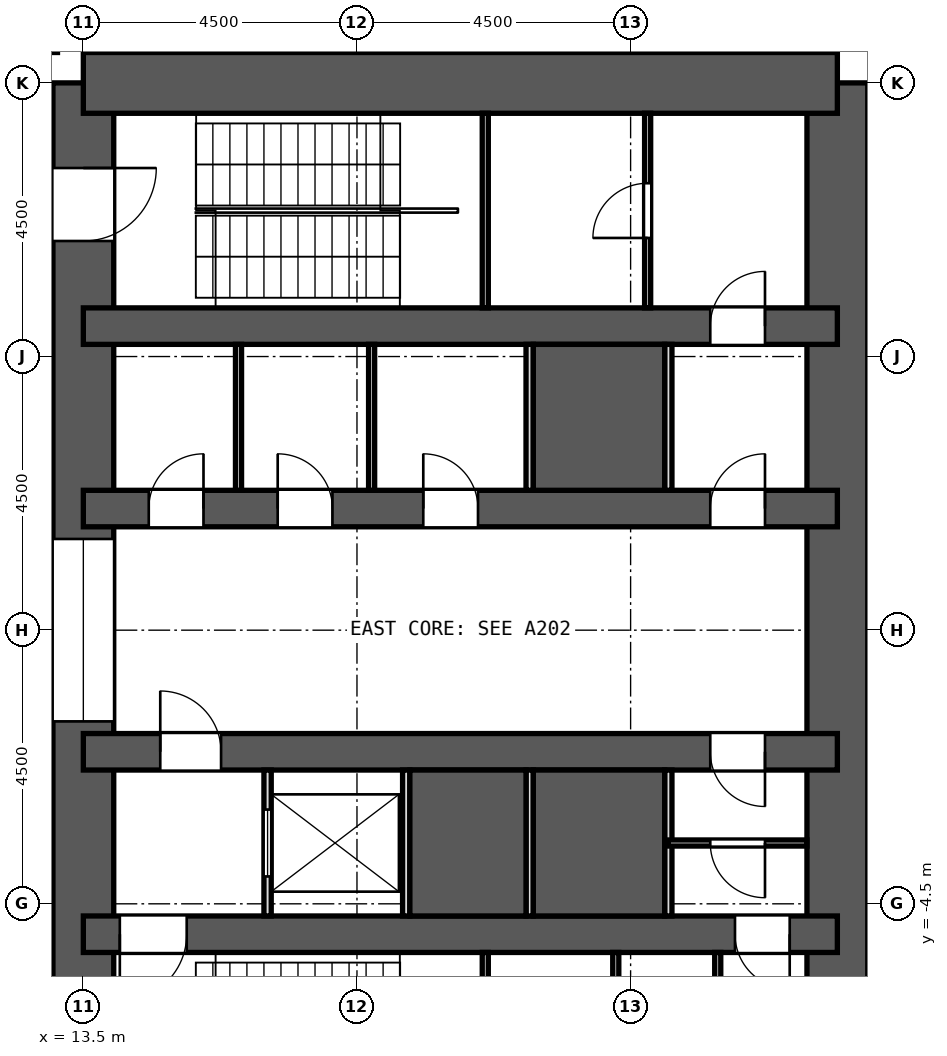
"""IFC4 building model, lengths in metres.
Left out: names, types, materials, properties, quantities, classifications, styles, units other than length and angle.
Written with IfcOpenShell. Run it as: python <this file> out.ifc"""

import sys

from ifc_helpers import new_model, si_unit, direction, frame, frame_2d, origin, place, context, subcontext, project, spatial, rectangle, extrude, element, fill, save


model = new_model("IFC4")
c1 = context("Model", 3, precision=1e-05, world=origin(), true_north=direction((0.0, 1.0)))
c2 = subcontext(c1, "Body", "Model", "MODEL_VIEW")
j1 = project(units=[si_unit("LENGTHUNIT", "METRE"), si_unit("PLANEANGLEUNIT", "RADIAN")], contexts=[c1])
p1 = place(None, origin())
s1 = spatial("IfcSite", under=j1, at=p1, CompositionType="ELEMENT")
p2 = place(p1, origin())
s2 = spatial("IfcBuilding", under=s1, at=p2, CompositionType="ELEMENT")
p3 = place(p2, frame((0.0, 0.0, -4.5)))
s3 = spatial("IfcBuildingStorey", under=s2, at=p3, CompositionType="ELEMENT", Elevation=-4.5)
p4 = place(p3, frame((13.5, -9.0, 0.0), z_axis=(0.0, 0.0, 1.0), x_axis=(0.0, 1.0, 0.0)))
e1 = element("IfcWall", 1, at=p4, inside=s3, PredefinedType="SHEAR", context=c2, shape_type="SweptSolid", body=[
    extrude(rectangle(XDim=18.0, YDim=1.0, at=frame_2d((9.0, 0.0))), origin(), (0.0, 0.0, 1.0), 4.5),
])
p5 = place(p4, frame((15.4, 0.0, 0.0)))
e2 = element("IfcOpeningElement", 2, at=p5, cuts=e1, PredefinedType="OPENING", context=c2, shape_type="SweptSolid", body=[
    extrude(rectangle(XDim=1.2, YDim=2.1, at=frame_2d((0.6, 1.05))), frame((0.0, 0.512, 0.0), z_axis=(0.0, -1.0, 0.0), x_axis=(1.0, 0.0, 0.0)), (0.0, 0.0, 1.0), 1.024),
])
p6 = place(p4, frame((1.4, 0.0, 0.0)))
e3 = element("IfcOpeningElement", 3, at=p6, cuts=e1, PredefinedType="OPENING", context=c2, shape_type="SweptSolid", body=[
    extrude(rectangle(XDim=1.2, YDim=2.1, at=frame_2d((0.6, 1.05))), frame((0.0, 0.512, 0.0), z_axis=(0.0, -1.0, 0.0), x_axis=(1.0, 0.0, 0.0)), (0.0, 0.0, 1.0), 1.024),
])
p7 = place(p4, frame((7.5, 0.0, 0.0)))
e4 = element("IfcOpeningElement", 4, at=p7, cuts=e1, PredefinedType="OPENING", context=c2, shape_type="SweptSolid", body=[
    extrude(rectangle(XDim=3.0, YDim=2.4, at=frame_2d((1.5, 1.2))), frame((0.0, 0.512, 0.0), z_axis=(0.0, -1.0, 0.0), x_axis=(1.0, 0.0, 0.0)), (0.0, 0.0, 1.0), 1.024),
])
p8 = place(p3, frame((25.9, -9.0, 0.0), z_axis=(0.0, 0.0, 1.0), x_axis=(0.0, 1.0, 0.0)))
e5 = element("IfcWall", 5, at=p8, inside=s3, PredefinedType="SHEAR", context=c2, shape_type="SweptSolid", body=[
    extrude(rectangle(XDim=18.0, YDim=1.0, at=frame_2d((9.0, 0.0))), origin(), (0.0, 0.0, 1.0), 4.5),
])
p9 = place(p3, frame((13.5, 9.0, 0.0), z_axis=(0.0, 0.0, 1.0), x_axis=(1.0, 0.0, 0.0)))
e6 = element("IfcWall", 6, at=p9, inside=s3, PredefinedType="SHEAR", context=c2, shape_type="SweptSolid", body=[
    extrude(rectangle(XDim=12.4, YDim=1.0, at=frame_2d((6.2, 0.0))), origin(), (0.0, 0.0, 1.0), 4.5),
])
p10 = place(p3, frame((13.5, 5.0, 0.0), z_axis=(0.0, 0.0, 1.0), x_axis=(1.0, 0.0, 0.0)))
e7 = element("IfcWall", 7, at=p10, inside=s3, PredefinedType="SHEAR", context=c2, shape_type="SweptSolid", body=[
    extrude(rectangle(XDim=12.4, YDim=0.6, at=frame_2d((6.2, 0.0))), origin(), (0.0, 0.0, 1.0), 4.5),
])
p11 = place(p10, frame((10.31, 0.0, 0.0)))
e8 = element("IfcOpeningElement", 8, at=p11, cuts=e7, PredefinedType="OPENING", context=c2, shape_type="SweptSolid", body=[
    extrude(rectangle(XDim=0.9, YDim=2.1, at=frame_2d((0.45, 1.05))), frame((0.0, 0.312, 0.0), z_axis=(0.0, -1.0, 0.0), x_axis=(1.0, 0.0, 0.0)), (0.0, 0.0, 1.0), 0.624),
])
p12 = place(p3, frame((13.5, -5.0, 0.0), z_axis=(0.0, 0.0, 1.0), x_axis=(1.0, 0.0, 0.0)))
e9 = element("IfcWall", 9, at=p12, inside=s3, PredefinedType="SHEAR", context=c2, shape_type="SweptSolid", body=[
    extrude(rectangle(XDim=12.4, YDim=0.6, at=frame_2d((6.2, 0.0))), origin(), (0.0, 0.0, 1.0), 4.5),
])
p13 = place(p12, frame((10.716, 0.0, 0.0)))
e10 = element("IfcOpeningElement", 10, at=p13, cuts=e9, PredefinedType="OPENING", context=c2, shape_type="SweptSolid", body=[
    extrude(rectangle(XDim=0.9, YDim=2.1, at=frame_2d((0.45, 1.05))), frame((0.0, 0.312, 0.0), z_axis=(0.0, -1.0, 0.0), x_axis=(1.0, 0.0, 0.0)), (0.0, 0.0, 1.0), 0.624),
])
p14 = place(p12, frame((0.6, 0.0, 0.0)))
e11 = element("IfcOpeningElement", 11, at=p14, cuts=e9, PredefinedType="OPENING", context=c2, shape_type="SweptSolid", body=[
    extrude(rectangle(XDim=1.1, YDim=2.1, at=frame_2d((0.55, 1.05))), frame((0.0, 0.312, 0.0), z_axis=(0.0, -1.0, 0.0), x_axis=(1.0, 0.0, 0.0)), (0.0, 0.0, 1.0), 0.624),
])
p15 = place(p3, frame((13.5, 2.0, 0.0), z_axis=(0.0, 0.0, 1.0), x_axis=(1.0, 0.0, 0.0)))
e12 = element("IfcWall", 12, at=p15, inside=s3, PredefinedType="SHEAR", context=c2, shape_type="SweptSolid", body=[
    extrude(rectangle(XDim=12.4, YDim=0.6, at=frame_2d((6.2, 0.0))), origin(), (0.0, 0.0, 1.0), 4.5),
])
p16 = place(p15, frame((1.076, 0.0, 0.0)))
e13 = element("IfcOpeningElement", 13, at=p16, cuts=e12, PredefinedType="OPENING", context=c2, shape_type="SweptSolid", body=[
    extrude(rectangle(XDim=0.9, YDim=2.1, at=frame_2d((0.45, 1.05))), frame((0.0, 0.312, 0.0), z_axis=(0.0, -1.0, 0.0), x_axis=(1.0, 0.0, 0.0)), (0.0, 0.0, 1.0), 0.624),
])
p17 = place(p15, frame((3.196, 0.0, 0.0)))
e14 = element("IfcOpeningElement", 14, at=p17, cuts=e12, PredefinedType="OPENING", context=c2, shape_type="SweptSolid", body=[
    extrude(rectangle(XDim=0.9, YDim=2.1, at=frame_2d((0.45, 1.05))), frame((0.0, 0.312, 0.0), z_axis=(0.0, -1.0, 0.0), x_axis=(1.0, 0.0, 0.0)), (0.0, 0.0, 1.0), 0.624),
])
p18 = place(p15, frame((5.59, 0.0, 0.0)))
e15 = element("IfcOpeningElement", 15, at=p18, cuts=e12, PredefinedType="OPENING", context=c2, shape_type="SweptSolid", body=[
    extrude(rectangle(XDim=0.9, YDim=2.1, at=frame_2d((0.45, 1.05))), frame((0.0, 0.312, 0.0), z_axis=(0.0, -1.0, 0.0), x_axis=(1.0, 0.0, 0.0)), (0.0, 0.0, 1.0), 0.624),
])
p19 = place(p15, frame((10.31, 0.0, 0.0)))
e16 = element("IfcOpeningElement", 16, at=p19, cuts=e12, PredefinedType="OPENING", context=c2, shape_type="SweptSolid", body=[
    extrude(rectangle(XDim=0.9, YDim=2.1, at=frame_2d((0.45, 1.05))), frame((0.0, 0.312, 0.0), z_axis=(0.0, -1.0, 0.0), x_axis=(1.0, 0.0, 0.0)), (0.0, 0.0, 1.0), 0.624),
])
p20 = place(p3, frame((13.5, -2.0, 0.0), z_axis=(0.0, 0.0, 1.0), x_axis=(1.0, 0.0, 0.0)))
e17 = element("IfcWall", 17, at=p20, inside=s3, PredefinedType="SHEAR", context=c2, shape_type="SweptSolid", body=[
    extrude(rectangle(XDim=12.4, YDim=0.6, at=frame_2d((6.2, 0.0))), origin(), (0.0, 0.0, 1.0), 4.5),
])
p21 = place(p20, frame((1.265, 0.0, 0.0)))
e18 = element("IfcOpeningElement", 18, at=p21, cuts=e17, PredefinedType="OPENING", context=c2, shape_type="SweptSolid", body=[
    extrude(rectangle(XDim=1.0, YDim=2.1, at=frame_2d((0.5, 1.05))), frame((0.0, 0.312, 0.0), z_axis=(0.0, -1.0, 0.0), x_axis=(1.0, 0.0, 0.0)), (0.0, 0.0, 1.0), 0.624),
])
p22 = place(p20, frame((10.31, 0.0, 0.0)))
e19 = element("IfcOpeningElement", 19, at=p22, cuts=e17, PredefinedType="OPENING", context=c2, shape_type="SweptSolid", body=[
    extrude(rectangle(XDim=0.9, YDim=2.1, at=frame_2d((0.45, 1.05))), frame((0.0, 0.312, 0.0), z_axis=(0.0, -1.0, 0.0), x_axis=(1.0, 0.0, 0.0)), (0.0, 0.0, 1.0), 0.624),
])
p23 = place(p3, frame((9.13, 9.13, 0.0), z_axis=(0.0, 0.0, 1.0), x_axis=(0.707106781187, 0.707106781187, 0.0)))
e20 = element("IfcWall", 20, at=p23, inside=s3, PredefinedType="PARTITIONING", context=c2, shape_type="SweptSolid", body=[
    extrude(rectangle(XDim=5.423, YDim=0.15, at=frame_2d((2.711, 0.0))), origin(), (0.0, 0.0, 1.0), 3.95),
])
p24 = place(p23, frame((2.251, 0.0, 0.0)))
e21 = element("IfcOpeningElement", 21, at=p24, cuts=e20, PredefinedType="OPENING", context=c2, shape_type="SweptSolid", body=[
    extrude(rectangle(XDim=0.9, YDim=2.1, at=frame_2d((0.45, 1.05))), frame((0.0, 0.087, 0.0), z_axis=(0.0, -1.0, 0.0), x_axis=(1.0, 0.0, 0.0)), (0.0, 0.0, 1.0), 0.174),
])
p25 = place(p3, frame((13.0, 9.5, 0.0), z_axis=(0.0, 0.0, 1.0), x_axis=(0.0, 1.0, 0.0)))
e22 = element("IfcWall", 22, at=p25, inside=s3, PredefinedType="PARTITIONING", context=c2, shape_type="SweptSolid", body=[
    extrude(rectangle(XDim=3.425, YDim=0.15, at=frame_2d((1.712, 0.0))), origin(), (0.0, 0.0, 1.0), 3.95),
])
p26 = place(p25, frame((1.15, 0.0, 0.0)))
e23 = element("IfcOpeningElement", 23, at=p26, cuts=e22, PredefinedType="OPENING", context=c2, shape_type="SweptSolid", body=[
    extrude(rectangle(XDim=1.2, YDim=2.1, at=frame_2d((0.6, 1.05))), frame((0.0, 0.087, 0.0), z_axis=(0.0, -1.0, 0.0), x_axis=(1.0, 0.0, 0.0)), (0.0, 0.0, 1.0), 0.174),
])
for number, where, z_axis, x_axis in (
    (24, (16.052, 2.3, 0.0), (0.0, 0.0, 1.0), (0.0, 1.0, 0.0)),
    (25, (18.241, 2.3, 0.0), (0.0, 0.0, 1.0), (0.0, 1.0, 0.0)),
):
    element("IfcWall", number, at=place(p3, frame(where, z_axis=z_axis, x_axis=x_axis)), inside=s3, PredefinedType="PARTITIONING", context=c2, shape_type="SweptSolid", body=[
        extrude(rectangle(XDim=2.4, YDim=0.1, at=frame_2d((1.2, 0.0))), origin(), (0.0, 0.0, 1.0), 3.95),
    ])
for number, where, z_axis, x_axis in (
    (26, (20.84, 2.3, 0.0), (0.0, 0.0, 1.0), (0.0, 1.0, 0.0)),
    (27, (23.12, 2.3, 0.0), (0.0, 0.0, 1.0), (0.0, 1.0, 0.0)),
):
    element("IfcWall", number, at=place(p3, frame(where, z_axis=z_axis, x_axis=x_axis)), inside=s3, PredefinedType="PARTITIONING", context=c2, shape_type="SweptSolid", body=[
        extrude(rectangle(XDim=2.4, YDim=0.12, at=frame_2d((1.2, 0.0))), origin(), (0.0, 0.0, 1.0), 3.95),
    ])
p27 = place(p3, frame((16.53, -4.7, 0.0), z_axis=(0.0, 0.0, 1.0), x_axis=(0.0, 1.0, 0.0)))
e28 = element("IfcWall", 28, at=p27, inside=s3, PredefinedType="PARTITIONING", context=c2, shape_type="SweptSolid", body=[
    extrude(rectangle(XDim=2.4, YDim=0.12, at=frame_2d((1.2, 0.0))), origin(), (0.0, 0.0, 1.0), 3.95),
])
p28 = place(p27, frame((0.65, 0.0, 0.0)))
e29 = element("IfcOpeningElement", 29, at=p28, cuts=e28, PredefinedType="OPENING", context=c2, shape_type="SweptSolid", body=[
    extrude(rectangle(XDim=1.1, YDim=2.1, at=frame_2d((0.55, 1.05))), frame((0.0, 0.072, 0.0), z_axis=(0.0, -1.0, 0.0), x_axis=(1.0, 0.0, 0.0)), (0.0, 0.0, 1.0), 0.144),
])
for number, where, z_axis, x_axis in (
    (30, (18.81, -4.7, 0.0), (0.0, 0.0, 1.0), (0.0, 1.0, 0.0)),
    (31, (20.84, -4.7, 0.0), (0.0, 0.0, 1.0), (0.0, 1.0, 0.0)),
    (32, (23.12, -4.7, 0.0), (0.0, 0.0, 1.0), (0.0, 1.0, 0.0)),
):
    element("IfcWall", number, at=place(p3, frame(where, z_axis=z_axis, x_axis=x_axis)), inside=s3, PredefinedType="PARTITIONING", context=c2, shape_type="SweptSolid", body=[
        extrude(rectangle(XDim=2.4, YDim=0.12, at=frame_2d((1.2, 0.0))), origin(), (0.0, 0.0, 1.0), 3.95),
    ])
p29 = place(p3, frame((23.12, -3.5, 0.0), z_axis=(0.0, 0.0, 1.0), x_axis=(1.0, 0.0, 0.0)))
e33 = element("IfcWall", 33, at=p29, inside=s3, PredefinedType="PARTITIONING", context=c2, shape_type="SweptSolid", body=[
    extrude(rectangle(XDim=2.28, YDim=0.1, at=frame_2d((1.14, 0.0))), origin(), (0.0, 0.0, 1.0), 3.95),
])
p30 = place(p29, frame((0.69, 0.0, 0.0)))
e34 = element("IfcOpeningElement", 34, at=p30, cuts=e33, PredefinedType="OPENING", context=c2, shape_type="SweptSolid", body=[
    extrude(rectangle(XDim=0.9, YDim=2.1, at=frame_2d((0.45, 1.05))), frame((0.0, 0.062, 0.0), z_axis=(0.0, -1.0, 0.0), x_axis=(1.0, 0.0, 0.0)), (0.0, 0.0, 1.0), 0.124),
])
p31 = place(p3, frame((20.11, 5.3, 0.0), z_axis=(0.0, 0.0, 1.0), x_axis=(0.0, 1.0, 0.0)))
e35 = element("IfcWall", 35, at=p31, inside=s3, PredefinedType="PARTITIONING", context=c2, shape_type="SweptSolid", body=[
    extrude(rectangle(XDim=3.2, YDim=0.1, at=frame_2d((1.6, 0.0))), origin(), (0.0, 0.0, 1.0), 3.95),
])
p32 = place(p3, frame((22.78, 5.3, 0.0), z_axis=(0.0, 0.0, 1.0), x_axis=(0.0, 1.0, 0.0)))
e36 = element("IfcWall", 36, at=p32, inside=s3, PredefinedType="PARTITIONING", context=c2, shape_type="SweptSolid", body=[
    extrude(rectangle(XDim=3.2, YDim=0.1, at=frame_2d((1.6, 0.0))), origin(), (0.0, 0.0, 1.0), 3.95),
])
p33 = place(p32, frame((1.15, 0.0, 0.0)))
e37 = element("IfcOpeningElement", 37, at=p33, cuts=e36, PredefinedType="OPENING", context=c2, shape_type="SweptSolid", body=[
    extrude(rectangle(XDim=0.9, YDim=2.1, at=frame_2d((0.45, 1.05))), frame((0.0, 0.062, 0.0), z_axis=(0.0, -1.0, 0.0), x_axis=(1.0, 0.0, 0.0)), (0.0, 0.0, 1.0), 0.124),
])
p34 = place(p3, frame((20.11, -8.5, 0.0), z_axis=(0.0, 0.0, 1.0), x_axis=(0.0, 1.0, 0.0)))
e38 = element("IfcWall", 38, at=p34, inside=s3, PredefinedType="PARTITIONING", context=c2, shape_type="SweptSolid", body=[
    extrude(rectangle(XDim=3.2, YDim=0.1, at=frame_2d((1.6, 0.0))), origin(), (0.0, 0.0, 1.0), 3.95),
])
p35 = place(p3, frame((22.256, -8.5, 0.0), z_axis=(0.0, 0.0, 1.0), x_axis=(0.0, 1.0, 0.0)))
e39 = element("IfcWall", 39, at=p35, inside=s3, PredefinedType="PARTITIONING", context=c2, shape_type="SweptSolid", body=[
    extrude(rectangle(XDim=3.2, YDim=0.1, at=frame_2d((1.6, 0.0))), origin(), (0.0, 0.0, 1.0), 3.95),
])
p36 = place(p35, frame((1.15, 0.0, 0.0)))
e40 = element("IfcOpeningElement", 40, at=p36, cuts=e39, PredefinedType="OPENING", context=c2, shape_type="SweptSolid", body=[
    extrude(rectangle(XDim=0.9, YDim=2.1, at=frame_2d((0.45, 1.05))), frame((0.0, 0.062, 0.0), z_axis=(0.0, -1.0, 0.0), x_axis=(1.0, 0.0, 0.0)), (0.0, 0.0, 1.0), 0.124),
])
p37 = place(p3, frame((23.933, -8.5, 0.0), z_axis=(0.0, 0.0, 1.0), x_axis=(0.0, 1.0, 0.0)))
e41 = element("IfcWall", 41, at=p37, inside=s3, PredefinedType="PARTITIONING", context=c2, shape_type="SweptSolid", body=[
    extrude(rectangle(XDim=3.2, YDim=0.1, at=frame_2d((1.6, 0.0))), origin(), (0.0, 0.0, 1.0), 3.95),
])
p38 = place(p37, frame((1.15, 0.0, 0.0)))
e42 = element("IfcOpeningElement", 42, at=p38, cuts=e41, PredefinedType="OPENING", context=c2, shape_type="SweptSolid", body=[
    extrude(rectangle(XDim=0.9, YDim=2.1, at=frame_2d((0.45, 1.05))), frame((0.0, 0.062, 0.0), z_axis=(0.0, -1.0, 0.0), x_axis=(1.0, 0.0, 0.0)), (0.0, 0.0, 1.0), 0.124),
])
p39 = place(p3, frame((20.9, 3.5, 0.0), z_axis=(0.0, 0.0, 1.0), x_axis=(1.0, 0.0, 0.0)))
e43 = element("IfcWall", 43, at=p39, inside=s3, PredefinedType="SOLIDWALL", context=c2, shape_type="SweptSolid", body=[
    extrude(rectangle(XDim=2.16, YDim=2.4, at=frame_2d((1.08, 0.0))), origin(), (0.0, 0.0, 1.0), 3.1),
])
p40 = place(p3, frame((18.87, -3.5, 0.0), z_axis=(0.0, 0.0, 1.0), x_axis=(1.0, 0.0, 0.0)))
e44 = element("IfcWall", 44, at=p40, inside=s3, PredefinedType="SOLIDWALL", context=c2, shape_type="SweptSolid", body=[
    extrude(rectangle(XDim=1.91, YDim=2.4, at=frame_2d((0.955, 0.0))), origin(), (0.0, 0.0, 1.0), 3.1),
])
p41 = place(p3, frame((20.9, -3.5, 0.0), z_axis=(0.0, 0.0, 1.0), x_axis=(1.0, 0.0, 0.0)))
e45 = element("IfcWall", 45, at=p41, inside=s3, PredefinedType="SOLIDWALL", context=c2, shape_type="SweptSolid", body=[
    extrude(rectangle(XDim=2.16, YDim=2.4, at=frame_2d((1.08, 0.0))), origin(), (0.0, 0.0, 1.0), 3.1),
])
p42 = place(p28, origin())
e46 = element("IfcDoor", 46, at=p42, inside=s3, OperationType="DOUBLE_DOOR_SLIDING", PredefinedType="DOOR", context=c2, shape_type="SweptSolid", body=[
    extrude(rectangle(XDim=1.1, YDim=2.1, at=frame_2d((0.55, 1.05))), frame((0.0, 0.025, 0.0), z_axis=(0.0, -1.0, 0.0), x_axis=(1.0, 0.0, 0.0)), (0.0, 0.0, 1.0), 0.05),
])
fill(e29, e46)
p43 = place(p16, origin())
e47 = element("IfcDoor", 47, at=p43, inside=s3, OperationType="SINGLE_SWING_RIGHT", PredefinedType="DOOR", context=c2, shape_type="SweptSolid", body=[
    extrude(rectangle(XDim=0.9, YDim=2.1, at=frame_2d((0.45, 1.05))), frame((0.0, 0.025, 0.0), z_axis=(0.0, -1.0, 0.0), x_axis=(1.0, 0.0, 0.0)), (0.0, 0.0, 1.0), 0.05),
])
fill(e13, e47)
p44 = place(p17, origin())
e48 = element("IfcDoor", 48, at=p44, inside=s3, OperationType="SINGLE_SWING_LEFT", PredefinedType="DOOR", context=c2, shape_type="SweptSolid", body=[
    extrude(rectangle(XDim=0.9, YDim=2.1, at=frame_2d((0.45, 1.05))), frame((0.0, 0.025, 0.0), z_axis=(0.0, -1.0, 0.0), x_axis=(1.0, 0.0, 0.0)), (0.0, 0.0, 1.0), 0.05),
])
fill(e14, e48)
p45 = place(p18, origin())
e49 = element("IfcDoor", 49, at=p45, inside=s3, OperationType="SINGLE_SWING_LEFT", PredefinedType="DOOR", context=c2, shape_type="SweptSolid", body=[
    extrude(rectangle(XDim=0.9, YDim=2.1, at=frame_2d((0.45, 1.05))), frame((0.0, 0.025, 0.0), z_axis=(0.0, -1.0, 0.0), x_axis=(1.0, 0.0, 0.0)), (0.0, 0.0, 1.0), 0.05),
])
fill(e15, e49)
p46 = place(p19, origin())
e50 = element("IfcDoor", 50, at=p46, inside=s3, OperationType="SINGLE_SWING_RIGHT", PredefinedType="DOOR", context=c2, shape_type="SweptSolid", body=[
    extrude(rectangle(XDim=0.9, YDim=2.1, at=frame_2d((0.45, 1.05))), frame((0.0, 0.025, 0.0), z_axis=(0.0, -1.0, 0.0), x_axis=(1.0, 0.0, 0.0)), (0.0, 0.0, 1.0), 0.05),
])
fill(e16, e50)
p47 = place(p21, origin())
e51 = element("IfcDoor", 51, at=p47, inside=s3, OperationType="SINGLE_SWING_LEFT", PredefinedType="DOOR", context=c2, shape_type="SweptSolid", body=[
    extrude(rectangle(XDim=1.0, YDim=2.1, at=frame_2d((0.5, 1.05))), frame((0.0, 0.025, 0.0), z_axis=(0.0, -1.0, 0.0), x_axis=(1.0, 0.0, 0.0)), (0.0, 0.0, 1.0), 0.05),
])
fill(e18, e51)
p48 = place(p22, frame((0.9, 0.0, 0.0), z_axis=(0.0, 0.0, 1.0), x_axis=(-1.0, 0.0, 0.0)))
e52 = element("IfcDoor", 52, at=p48, inside=s3, OperationType="SINGLE_SWING_LEFT", PredefinedType="DOOR", context=c2, shape_type="SweptSolid", body=[
    extrude(rectangle(XDim=0.9, YDim=2.1, at=frame_2d((0.45, 1.05))), frame((0.0, 0.025, 0.0), z_axis=(0.0, -1.0, 0.0), x_axis=(1.0, 0.0, 0.0)), (0.0, 0.0, 1.0), 0.05),
])
fill(e19, e52)
p49 = place(p33, origin())
e53 = element("IfcDoor", 53, at=p49, inside=s3, OperationType="SINGLE_SWING_LEFT", PredefinedType="DOOR", context=c2, shape_type="SweptSolid", body=[
    extrude(rectangle(XDim=0.9, YDim=2.1, at=frame_2d((0.45, 1.05))), frame((0.0, 0.025, 0.0), z_axis=(0.0, -1.0, 0.0), x_axis=(1.0, 0.0, 0.0)), (0.0, 0.0, 1.0), 0.05),
])
fill(e37, e53)
p50 = place(p11, origin())
e54 = element("IfcDoor", 54, at=p50, inside=s3, OperationType="SINGLE_SWING_RIGHT", PredefinedType="DOOR", context=c2, shape_type="SweptSolid", body=[
    extrude(rectangle(XDim=0.9, YDim=2.1, at=frame_2d((0.45, 1.05))), frame((0.0, 0.025, 0.0), z_axis=(0.0, -1.0, 0.0), x_axis=(1.0, 0.0, 0.0)), (0.0, 0.0, 1.0), 0.05),
])
fill(e8, e54)
p51 = place(p30, frame((0.9, 0.0, 0.0), z_axis=(0.0, 0.0, 1.0), x_axis=(-1.0, 0.0, 0.0)))
e55 = element("IfcDoor", 55, at=p51, inside=s3, OperationType="SINGLE_SWING_LEFT", PredefinedType="DOOR", context=c2, shape_type="SweptSolid", body=[
    extrude(rectangle(XDim=0.9, YDim=2.1, at=frame_2d((0.45, 1.05))), frame((0.0, 0.025, 0.0), z_axis=(0.0, -1.0, 0.0), x_axis=(1.0, 0.0, 0.0)), (0.0, 0.0, 1.0), 0.05),
])
fill(e34, e55)
p52 = place(p13, frame((0.9, 0.0, 0.0), z_axis=(0.0, 0.0, 1.0), x_axis=(-1.0, 0.0, 0.0)))
e56 = element("IfcDoor", 56, at=p52, inside=s3, OperationType="SINGLE_SWING_LEFT", PredefinedType="DOOR", context=c2, shape_type="SweptSolid", body=[
    extrude(rectangle(XDim=0.9, YDim=2.1, at=frame_2d((0.45, 1.05))), frame((0.0, 0.025, 0.0), z_axis=(0.0, -1.0, 0.0), x_axis=(1.0, 0.0, 0.0)), (0.0, 0.0, 1.0), 0.05),
])
fill(e10, e56)
p53 = place(p14, frame((1.1, 0.0, 0.0), z_axis=(0.0, 0.0, 1.0), x_axis=(-1.0, 0.0, 0.0)))
e57 = element("IfcDoor", 57, at=p53, inside=s3, OperationType="SINGLE_SWING_RIGHT", PredefinedType="DOOR", context=c2, shape_type="SweptSolid", body=[
    extrude(rectangle(XDim=1.1, YDim=2.1, at=frame_2d((0.55, 1.05))), frame((0.0, 0.025, 0.0), z_axis=(0.0, -1.0, 0.0), x_axis=(1.0, 0.0, 0.0)), (0.0, 0.0, 1.0), 0.05),
])
fill(e11, e57)
p54 = place(p5, frame((1.2, 0.0, 0.0), z_axis=(0.0, 0.0, 1.0), x_axis=(-1.0, 0.0, 0.0)))
e58 = element("IfcDoor", 58, at=p54, inside=s3, OperationType="SINGLE_SWING_LEFT", PredefinedType="DOOR", context=c2, shape_type="SweptSolid", body=[
    extrude(rectangle(XDim=1.2, YDim=2.1, at=frame_2d((0.6, 1.05))), frame((0.0, 0.025, 0.0), z_axis=(0.0, -1.0, 0.0), x_axis=(1.0, 0.0, 0.0)), (0.0, 0.0, 1.0), 0.05),
])
fill(e2, e58)
p55 = place(p7, origin())
e59 = element("IfcDoor", 59, at=p55, inside=s3, OperationType="DOUBLE_DOOR_SLIDING", PredefinedType="DOOR", context=c2, shape_type="SweptSolid", body=[
    extrude(rectangle(XDim=3.0, YDim=2.4, at=frame_2d((1.5, 1.2))), frame((0.0, 0.025, 0.0), z_axis=(0.0, -1.0, 0.0), x_axis=(1.0, 0.0, 0.0)), (0.0, 0.0, 1.0), 0.05),
])
fill(e4, e59)
save(model, sys.argv[1])
